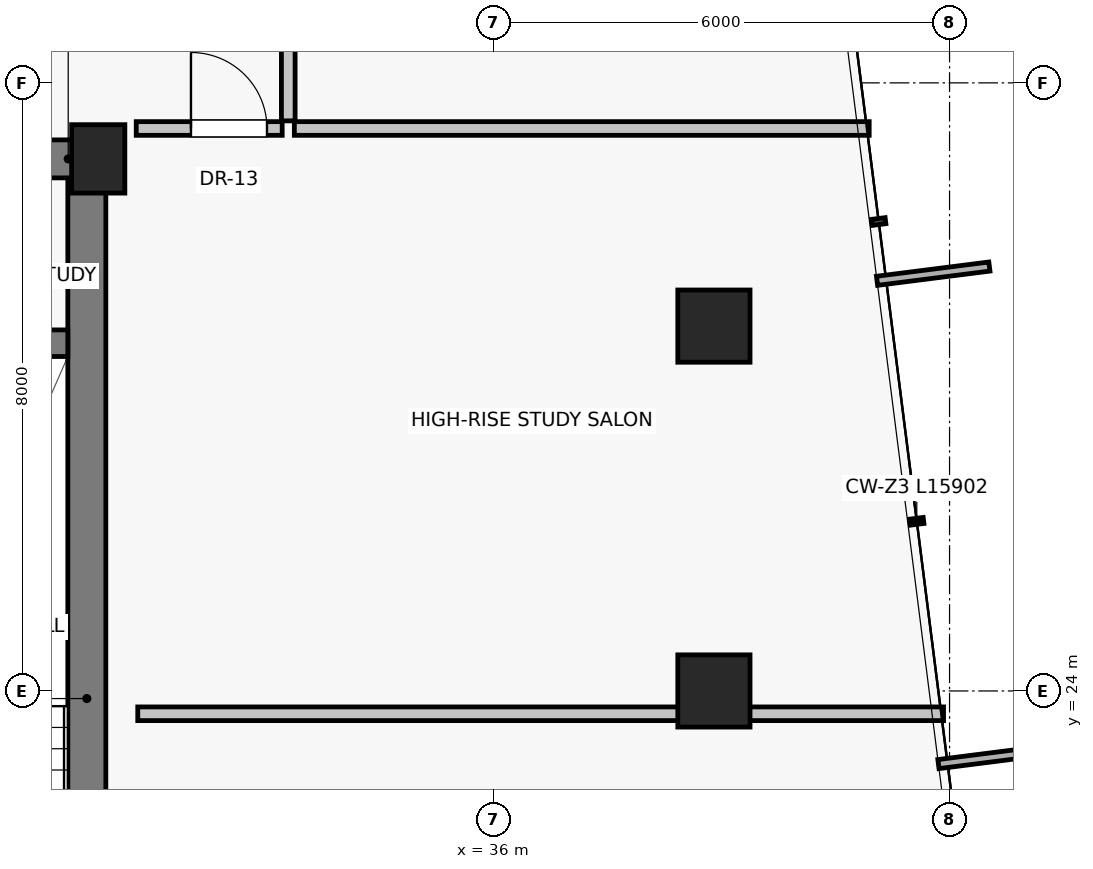
"""IFC4 building model, lengths in metres.
Left out: names, types, materials, properties, quantities, classifications, styles, units other than length and angle.
Written with IfcOpenShell. Run it as: python <this file> out.ifc"""

import sys

from ifc_helpers import new_model, si_unit, direction, frame, frame_2d, origin, origin_2d, place, context, subcontext, project, spatial, rectangle, extrude, source, transform, mapped, element, fill, save


model = new_model("IFC4")
c1 = context("Model", 3, precision=1e-05, world=origin(), true_north=direction((0.0, 1.0)))
c2 = subcontext(c1, "Body", "Model", "MODEL_VIEW")
j1 = project(units=[si_unit("LENGTHUNIT", "METRE"), si_unit("PLANEANGLEUNIT", "RADIAN")], contexts=[c1])
p1 = place(None, origin())
s1 = spatial("IfcSite", under=j1, at=p1, CompositionType="ELEMENT")
p2 = place(p1, origin())
s2 = spatial("IfcBuilding", under=s1, at=p2, CompositionType="ELEMENT")
p3 = place(p2, frame((0.0, 0.0, 182.1)))
s3 = spatial("IfcBuildingStorey", under=s2, at=p3, CompositionType="ELEMENT", Elevation=182.1)
p4 = place(p3, frame((30.8, 31.0, 0.0), z_axis=(0.0, 0.0, 1.0), x_axis=(1.0, 0.0, 0.0)))
e1 = element("IfcColumn", 1, at=p4, inside=s3, PredefinedType="PILASTER", context=c2, shape_type="SweptSolid", body=[
    extrude(rectangle(XDim=0.7, YDim=0.9, at=origin_2d()), origin(), (0.0, 0.0, 1.0), 3.25),
])
for number, where, z_axis, x_axis in (
    (2, (38.9, 24.0, 0.0), (0.0, 0.0, 1.0), (1.0, 0.0, 0.0)),
    (3, (38.9, 28.8, 0.0), (0.0, 0.0, 1.0), (1.0, 0.0, 0.0)),
):
    element("IfcColumn", number, at=place(p3, frame(where, z_axis=z_axis, x_axis=x_axis)), inside=s3, PredefinedType="COLUMN", context=c2, shape_type="SweptSolid", body=[
        extrude(rectangle(XDim=0.95, YDim=0.95, at=origin_2d()), origin(), (0.0, 0.0, 1.0), 3.25),
    ])
p5 = place(p3, frame((30.65, 16.8, 0.0), z_axis=(0.0, 0.0, 1.0), x_axis=(0.0, 1.0, 0.0)))
e4 = element("IfcWall", 4, at=p5, inside=s3, PredefinedType="SHEAR", context=c2, shape_type="SweptSolid", body=[
    extrude(rectangle(XDim=14.2, YDim=0.5, at=frame_2d((7.1, 0.0))), origin(), (0.0, 0.0, 1.0), 3.015),
])
p6 = place(p3, frame((27.0, 31.0, 0.0), z_axis=(0.0, 0.0, 1.0), x_axis=(1.0, 0.0, 0.0)))
e5 = element("IfcWall", 5, at=p6, inside=s3, PredefinedType="SHEAR", context=c2, shape_type="SweptSolid", body=[
    extrude(rectangle(XDim=3.8, YDim=0.5, at=frame_2d((1.9, 0.0))), origin(), (0.0, 0.0, 1.0), 3.015),
])
p7 = place(p6, frame((0.45, 0.0, 0.0)))
e6 = element("IfcOpeningElement", 6, at=p7, cuts=e5, PredefinedType="OPENING", context=c2, shape_type="SweptSolid", body=[
    extrude(rectangle(XDim=0.86, YDim=2.01, at=frame_2d((0.43, 1.005))), frame((0.0, 0.26, 0.0), z_axis=(0.0, -1.0, 0.0), x_axis=(1.0, 0.0, 0.0)), (0.0, 0.0, 1.0), 0.52),
])
p8 = place(p6, frame((1.9, 0.0, 0.0)))
e7 = element("IfcOpeningElement", 7, at=p8, cuts=e5, PredefinedType="OPENING", context=c2, shape_type="SweptSolid", body=[
    extrude(rectangle(XDim=0.86, YDim=2.01, at=frame_2d((0.43, 1.005))), frame((0.0, 0.26, 0.0), z_axis=(0.0, -1.0, 0.0), x_axis=(1.0, 0.0, 0.0)), (0.0, 0.0, 1.0), 0.52),
])
p9 = place(p3, frame((27.025, 28.575, 0.0), z_axis=(0.0, 0.0, 1.0), x_axis=(1.0, 0.0, 0.0)))
e8 = element("IfcWall", 8, at=p9, inside=s3, PredefinedType="SHEAR", context=c2, shape_type="SweptSolid", body=[
    extrude(rectangle(XDim=3.375, YDim=0.35, at=frame_2d((1.688, 0.0))), origin(), (0.0, 0.0, 1.0), 3.015),
])
p10 = place(p3, frame((31.32, 23.7, 0.0), z_axis=(0.0, 0.0, 1.0), x_axis=(1.0, 0.0, 0.0)))
e9 = element("IfcWall", 9, at=p10, inside=s3, PredefinedType="PARTITIONING", context=c2, shape_type="SweptSolid", body=[
    extrude(rectangle(XDim=10.601, YDim=0.18, at=frame_2d((5.3, 0.0))), origin(), (0.0, 0.0, 1.0), 3.015),
])
p11 = place(p3, frame((33.3, 31.5, 0.0), z_axis=(0.0, 0.0, 1.0), x_axis=(0.0, 1.0, 0.0)))
e10 = element("IfcWall", 10, at=p11, inside=s3, PredefinedType="PARTITIONING", context=c2, shape_type="SweptSolid", body=[
    extrude(rectangle(XDim=1.9, YDim=0.18, at=frame_2d((0.95, 0.0))), origin(), (0.0, 0.0, 1.0), 3.015),
])
p12 = place(p3, frame((31.3, 31.4, 0.0), z_axis=(0.0, 0.0, 1.0), x_axis=(1.0, 0.0, 0.0)))
e11 = element("IfcWall", 11, at=p12, inside=s3, PredefinedType="PARTITIONING", context=c2, shape_type="SweptSolid", body=[
    extrude(rectangle(XDim=1.92, YDim=0.18, at=frame_2d((0.96, 0.0))), origin(), (0.0, 0.0, 1.0), 3.015),
])
p13 = place(p12, frame((0.72, 0.0, 0.0)))
e12 = element("IfcOpeningElement", 12, at=p13, cuts=e11, PredefinedType="OPENING", context=c2, shape_type="SweptSolid", body=[
    extrude(rectangle(XDim=1.0, YDim=2.01, at=frame_2d((0.5, 1.005))), frame((0.0, 0.1, 0.0), z_axis=(0.0, -1.0, 0.0), x_axis=(1.0, 0.0, 0.0)), (0.0, 0.0, 1.0), 0.2),
])
p14 = place(p3, frame((33.38, 31.4, 0.0), z_axis=(0.0, 0.0, 1.0), x_axis=(1.0, 0.0, 0.0)))
e13 = element("IfcWall", 13, at=p14, inside=s3, PredefinedType="PARTITIONING", context=c2, shape_type="SweptSolid", body=[
    extrude(rectangle(XDim=7.563, YDim=0.18, at=frame_2d((3.781, 0.0))), origin(), (0.0, 0.0, 1.0), 3.015),
])
m1 = source(origin(), c2, "Body", "SweptSolid", [
    extrude(rectangle(XDim=1.0, YDim=2.01, at=frame_2d((0.5, 1.005))), frame((0.0, 0.025, 0.0), z_axis=(0.0, -1.0, 0.0), x_axis=(1.0, 0.0, 0.0)), (0.0, 0.0, 1.0), 0.05),
])
p15 = place(p13, origin())
e14 = element("IfcDoor", 14, at=p15, inside=s3, OperationType="SINGLE_SWING_LEFT", PredefinedType="DOOR", context=c2, shape_type="MappedRepresentation", body=[
    mapped(m1, transform((0.0, 0.0, 0.0), scale=1.0)),
])
fill(e12, e14)
save(model, sys.argv[1])
